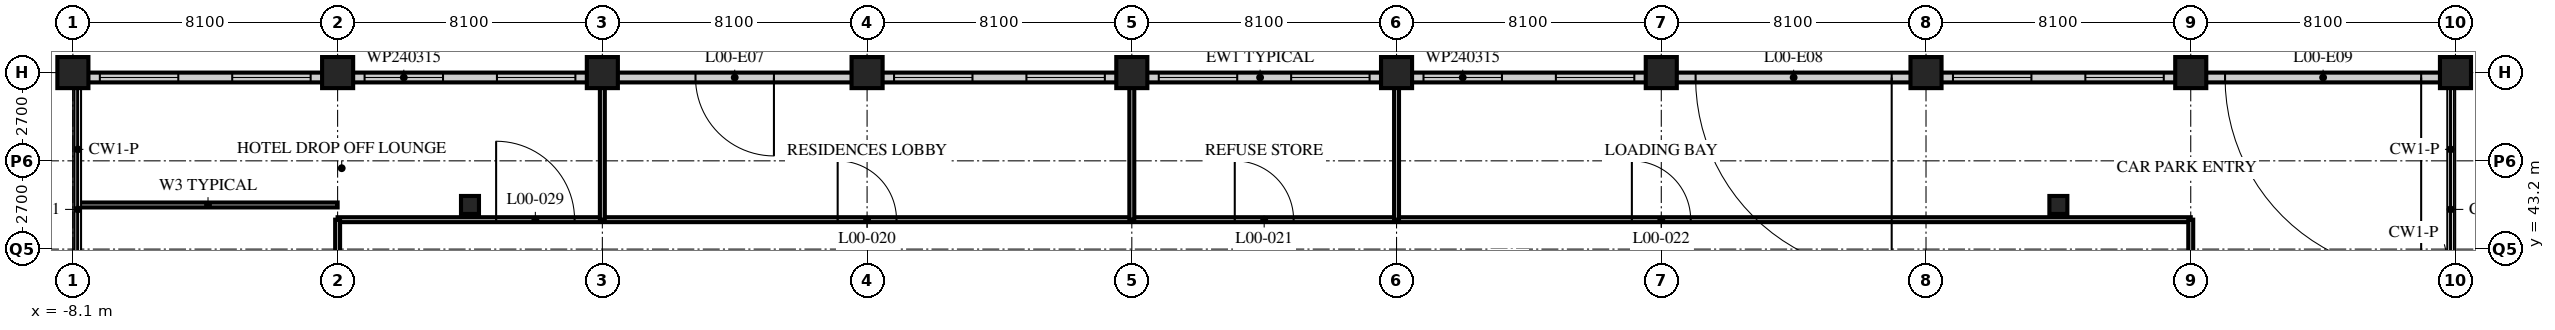
"""IFC4 building model, lengths in metres.
Left out: names, types, materials, properties, quantities, classifications, styles, units other than length and angle.
Written with IfcOpenShell. Run it as: python <this file> out.ifc"""

import sys

from ifc_helpers import new_model, si_unit, direction, frame, frame_2d, origin, origin_2d, place, context, subcontext, project, spatial, rectangle, hollow_rectangle, extrude, element, fill, save


model = new_model("IFC4")
c1 = context("Model", 3, precision=1e-05, world=origin(), true_north=direction((0.0, 1.0)))
c2 = subcontext(c1, "Body", "Model", "MODEL_VIEW")
j1 = project(units=[si_unit("LENGTHUNIT", "METRE"), si_unit("PLANEANGLEUNIT", "RADIAN")], contexts=[c1])
p1 = place(None, origin())
s1 = spatial("IfcSite", under=j1, at=p1, CompositionType="ELEMENT")
p2 = place(p1, origin())
s2 = spatial("IfcBuilding", under=s1, at=p2, CompositionType="ELEMENT")
p3 = place(p2, origin())
s3 = spatial("IfcBuildingStorey", under=s2, at=p3, CompositionType="ELEMENT", Elevation=0.0)
for number, where, z_axis, x_axis in (
    (1, (-8.1, 48.6, 0.0), (0.0, 0.0, 1.0), (1.0, 0.0, 0.0)),
    (2, (0.0, 48.6, 0.0), (0.0, 0.0, 1.0), (1.0, 0.0, 0.0)),
):
    element("IfcColumn", number, at=place(p3, frame(where, z_axis=z_axis, x_axis=x_axis)), inside=s3, PredefinedType="COLUMN", context=c2, shape_type="SweptSolid", body=[
        extrude(hollow_rectangle(XDim=0.95, YDim=0.95, WallThickness=0.1, at=origin_2d()), origin(), (0.0, 0.0, 1.0), 6.0),
    ])
p4 = place(p3, frame((4.05, 44.55, 0.0), z_axis=(0.0, 0.0, 1.0), x_axis=(1.0, 0.0, 0.0)))
e3 = element("IfcColumn", 3, at=p4, inside=s3, PredefinedType="COLUMN", context=c2, shape_type="SweptSolid", body=[
    extrude(hollow_rectangle(XDim=0.55, YDim=0.55, WallThickness=0.05, at=origin_2d()), origin(), (0.0, 0.0, 1.0), 6.0),
])
for number, where, z_axis, x_axis in (
    (4, (8.1, 48.6, 0.0), (0.0, 0.0, 1.0), (1.0, 0.0, 0.0)),
    (5, (16.2, 48.6, 0.0), (0.0, 0.0, 1.0), (1.0, 0.0, 0.0)),
    (6, (24.3, 48.6, 0.0), (0.0, 0.0, 1.0), (1.0, 0.0, 0.0)),
    (7, (32.4, 48.6, 0.0), (0.0, 0.0, 1.0), (1.0, 0.0, 0.0)),
    (8, (40.5, 48.6, 0.0), (0.0, 0.0, 1.0), (1.0, 0.0, 0.0)),
    (9, (48.6, 48.6, 0.0), (0.0, 0.0, 1.0), (1.0, 0.0, 0.0)),
):
    element("IfcColumn", number, at=place(p3, frame(where, z_axis=z_axis, x_axis=x_axis)), inside=s3, PredefinedType="COLUMN", context=c2, shape_type="SweptSolid", body=[
        extrude(hollow_rectangle(XDim=0.95, YDim=0.95, WallThickness=0.1, at=origin_2d()), origin(), (0.0, 0.0, 1.0), 6.0),
    ])
p5 = place(p3, frame((52.65, 44.55, 0.0), z_axis=(0.0, 0.0, 1.0), x_axis=(1.0, 0.0, 0.0)))
e10 = element("IfcColumn", 10, at=p5, inside=s3, PredefinedType="COLUMN", context=c2, shape_type="SweptSolid", body=[
    extrude(hollow_rectangle(XDim=0.55, YDim=0.55, WallThickness=0.05, at=origin_2d()), origin(), (0.0, 0.0, 1.0), 6.0),
])
for number, where, z_axis, x_axis in (
    (11, (56.7, 48.6, 0.0), (0.0, 0.0, 1.0), (1.0, 0.0, 0.0)),
    (12, (64.8, 48.6, 0.0), (0.0, 0.0, 1.0), (1.0, 0.0, 0.0)),
):
    element("IfcColumn", number, at=place(p3, frame(where, z_axis=z_axis, x_axis=x_axis)), inside=s3, PredefinedType="COLUMN", context=c2, shape_type="SweptSolid", body=[
        extrude(hollow_rectangle(XDim=0.95, YDim=0.95, WallThickness=0.1, at=origin_2d()), origin(), (0.0, 0.0, 1.0), 6.0),
    ])
p6 = place(p3, frame((64.55, 48.45, 0.0), z_axis=(0.0, 0.0, 1.0), x_axis=(-1.0, 0.0, 0.0)))
e13 = element("IfcWall", 13, at=p6, inside=s3, PredefinedType="SOLIDWALL", context=c2, shape_type="SweptSolid", body=[
    extrude(rectangle(XDim=72.65, YDim=0.3, at=frame_2d((36.325, 0.0))), origin(), (0.0, 0.0, 1.0), 5.75),
])
p7 = place(p6, frame((51.2, 0.0, 0.0)))
e14 = element("IfcOpeningElement", 14, at=p7, cuts=e13, PredefinedType="OPENING", context=c2, shape_type="SweptSolid", body=[
    extrude(rectangle(XDim=2.4, YDim=2.7, at=frame_2d((1.2, 1.35))), frame((0.0, 0.16, 0.0), z_axis=(0.0, -1.0, 0.0), x_axis=(1.0, 0.0, 0.0)), (0.0, 0.0, 1.0), 0.32),
])
p8 = place(p6, frame((17.0, 0.0, 0.0)))
e15 = element("IfcOpeningElement", 15, at=p8, cuts=e13, PredefinedType="OPENING", context=c2, shape_type="SweptSolid", body=[
    extrude(rectangle(XDim=6.0, YDim=3.6, at=frame_2d((3.0, 1.8))), frame((0.0, 0.16, 0.0), z_axis=(0.0, -1.0, 0.0), x_axis=(1.0, 0.0, 0.0)), (0.0, 0.0, 1.0), 0.32),
])
p9 = place(p6, frame((0.8, 0.0, 0.0)))
e16 = element("IfcOpeningElement", 16, at=p9, cuts=e13, PredefinedType="OPENING", context=c2, shape_type="SweptSolid", body=[
    extrude(rectangle(XDim=6.0, YDim=3.6, at=frame_2d((3.0, 1.8))), frame((0.0, 0.16, 0.0), z_axis=(0.0, -1.0, 0.0), x_axis=(1.0, 0.0, 0.0)), (0.0, 0.0, 1.0), 0.32),
])
p10 = place(p6, frame((8.675, 0.0, 1.2)))
e17 = element("IfcOpeningElement", 17, at=p10, cuts=e13, PredefinedType="OPENING", context=c2, shape_type="SweptSolid", body=[
    extrude(rectangle(XDim=2.4, YDim=3.15, at=frame_2d((1.2, 1.575))), frame((0.0, 0.16, 0.0), z_axis=(0.0, -1.0, 0.0), x_axis=(1.0, 0.0, 0.0)), (0.0, 0.0, 1.0), 0.32),
])
p11 = place(p6, frame((12.725, 0.0, 1.2)))
e18 = element("IfcOpeningElement", 18, at=p11, cuts=e13, PredefinedType="OPENING", context=c2, shape_type="SweptSolid", body=[
    extrude(rectangle(XDim=2.4, YDim=3.15, at=frame_2d((1.2, 1.575))), frame((0.0, 0.16, 0.0), z_axis=(0.0, -1.0, 0.0), x_axis=(1.0, 0.0, 0.0)), (0.0, 0.0, 1.0), 0.32),
])
p12 = place(p6, frame((24.875, 0.0, 1.2)))
e19 = element("IfcOpeningElement", 19, at=p12, cuts=e13, PredefinedType="OPENING", context=c2, shape_type="SweptSolid", body=[
    extrude(rectangle(XDim=2.4, YDim=3.15, at=frame_2d((1.2, 1.575))), frame((0.0, 0.16, 0.0), z_axis=(0.0, -1.0, 0.0), x_axis=(1.0, 0.0, 0.0)), (0.0, 0.0, 1.0), 0.32),
])
p13 = place(p6, frame((28.925, 0.0, 1.2)))
e20 = element("IfcOpeningElement", 20, at=p13, cuts=e13, PredefinedType="OPENING", context=c2, shape_type="SweptSolid", body=[
    extrude(rectangle(XDim=2.4, YDim=3.15, at=frame_2d((1.2, 1.575))), frame((0.0, 0.16, 0.0), z_axis=(0.0, -1.0, 0.0), x_axis=(1.0, 0.0, 0.0)), (0.0, 0.0, 1.0), 0.32),
])
p14 = place(p6, frame((32.975, 0.0, 1.2)))
e21 = element("IfcOpeningElement", 21, at=p14, cuts=e13, PredefinedType="OPENING", context=c2, shape_type="SweptSolid", body=[
    extrude(rectangle(XDim=2.4, YDim=3.15, at=frame_2d((1.2, 1.575))), frame((0.0, 0.16, 0.0), z_axis=(0.0, -1.0, 0.0), x_axis=(1.0, 0.0, 0.0)), (0.0, 0.0, 1.0), 0.32),
])
p15 = place(p6, frame((37.025, 0.0, 1.2)))
e22 = element("IfcOpeningElement", 22, at=p15, cuts=e13, PredefinedType="OPENING", context=c2, shape_type="SweptSolid", body=[
    extrude(rectangle(XDim=2.4, YDim=3.15, at=frame_2d((1.2, 1.575))), frame((0.0, 0.16, 0.0), z_axis=(0.0, -1.0, 0.0), x_axis=(1.0, 0.0, 0.0)), (0.0, 0.0, 1.0), 0.32),
])
p16 = place(p6, frame((41.075, 0.0, 1.2)))
e23 = element("IfcOpeningElement", 23, at=p16, cuts=e13, PredefinedType="OPENING", context=c2, shape_type="SweptSolid", body=[
    extrude(rectangle(XDim=2.4, YDim=3.15, at=frame_2d((1.2, 1.575))), frame((0.0, 0.16, 0.0), z_axis=(0.0, -1.0, 0.0), x_axis=(1.0, 0.0, 0.0)), (0.0, 0.0, 1.0), 0.32),
])
p17 = place(p6, frame((45.125, 0.0, 1.2)))
e24 = element("IfcOpeningElement", 24, at=p17, cuts=e13, PredefinedType="OPENING", context=c2, shape_type="SweptSolid", body=[
    extrude(rectangle(XDim=2.4, YDim=3.15, at=frame_2d((1.2, 1.575))), frame((0.0, 0.16, 0.0), z_axis=(0.0, -1.0, 0.0), x_axis=(1.0, 0.0, 0.0)), (0.0, 0.0, 1.0), 0.32),
])
p18 = place(p6, frame((57.275, 0.0, 1.2)))
e25 = element("IfcOpeningElement", 25, at=p18, cuts=e13, PredefinedType="OPENING", context=c2, shape_type="SweptSolid", body=[
    extrude(rectangle(XDim=2.4, YDim=3.15, at=frame_2d((1.2, 1.575))), frame((0.0, 0.16, 0.0), z_axis=(0.0, -1.0, 0.0), x_axis=(1.0, 0.0, 0.0)), (0.0, 0.0, 1.0), 0.32),
])
p19 = place(p6, frame((61.325, 0.0, 1.2)))
e26 = element("IfcOpeningElement", 26, at=p19, cuts=e13, PredefinedType="OPENING", context=c2, shape_type="SweptSolid", body=[
    extrude(rectangle(XDim=2.4, YDim=3.15, at=frame_2d((1.2, 1.575))), frame((0.0, 0.16, 0.0), z_axis=(0.0, -1.0, 0.0), x_axis=(1.0, 0.0, 0.0)), (0.0, 0.0, 1.0), 0.32),
])
p20 = place(p6, frame((65.375, 0.0, 1.2)))
e27 = element("IfcOpeningElement", 27, at=p20, cuts=e13, PredefinedType="OPENING", context=c2, shape_type="SweptSolid", body=[
    extrude(rectangle(XDim=2.4, YDim=3.15, at=frame_2d((1.2, 1.575))), frame((0.0, 0.16, 0.0), z_axis=(0.0, -1.0, 0.0), x_axis=(1.0, 0.0, 0.0)), (0.0, 0.0, 1.0), 0.32),
])
p21 = place(p6, frame((69.425, 0.0, 1.2)))
e28 = element("IfcOpeningElement", 28, at=p21, cuts=e13, PredefinedType="OPENING", context=c2, shape_type="SweptSolid", body=[
    extrude(rectangle(XDim=2.4, YDim=3.15, at=frame_2d((1.2, 1.575))), frame((0.0, 0.16, 0.0), z_axis=(0.0, -1.0, 0.0), x_axis=(1.0, 0.0, 0.0)), (0.0, 0.0, 1.0), 0.32),
])
p22 = place(p3, frame((0.0, 44.1, 0.0), z_axis=(0.0, 0.0, 1.0), x_axis=(1.0, 0.0, 0.0)))
e29 = element("IfcWall", 29, at=p22, inside=s3, PredefinedType="PARTITIONING", context=c2, shape_type="SweptSolid", body=[
    extrude(rectangle(XDim=56.7, YDim=0.15, at=frame_2d((28.35, 0.0))), origin(), (0.0, 0.0, 1.0), 5.75),
])
p23 = place(p22, frame((15.3, 0.0, 0.0)))
e30 = element("IfcOpeningElement", 30, at=p23, cuts=e29, PredefinedType="OPENING", context=c2, shape_type="SweptSolid", body=[
    extrude(rectangle(XDim=1.8, YDim=2.4, at=frame_2d((0.9, 1.2))), frame((0.0, 0.085, 0.0), z_axis=(0.0, -1.0, 0.0), x_axis=(1.0, 0.0, 0.0)), (0.0, 0.0, 1.0), 0.17),
])
p24 = place(p22, frame((27.45, 0.0, 0.0)))
e31 = element("IfcOpeningElement", 31, at=p24, cuts=e29, PredefinedType="OPENING", context=c2, shape_type="SweptSolid", body=[
    extrude(rectangle(XDim=1.8, YDim=2.4, at=frame_2d((0.9, 1.2))), frame((0.0, 0.085, 0.0), z_axis=(0.0, -1.0, 0.0), x_axis=(1.0, 0.0, 0.0)), (0.0, 0.0, 1.0), 0.17),
])
p25 = place(p22, frame((39.6, 0.0, 0.0)))
e32 = element("IfcOpeningElement", 32, at=p25, cuts=e29, PredefinedType="OPENING", context=c2, shape_type="SweptSolid", body=[
    extrude(rectangle(XDim=1.8, YDim=2.4, at=frame_2d((0.9, 1.2))), frame((0.0, 0.085, 0.0), z_axis=(0.0, -1.0, 0.0), x_axis=(1.0, 0.0, 0.0)), (0.0, 0.0, 1.0), 0.17),
])
p26 = place(p22, frame((4.85, 0.0, 0.0)))
e33 = element("IfcOpeningElement", 33, at=p26, cuts=e29, PredefinedType="OPENING", context=c2, shape_type="SweptSolid", body=[
    extrude(rectangle(XDim=2.4, YDim=2.7, at=frame_2d((1.2, 1.35))), frame((0.0, 0.085, 0.0), z_axis=(0.0, -1.0, 0.0), x_axis=(1.0, 0.0, 0.0)), (0.0, 0.0, 1.0), 0.17),
])
p27 = place(p3, frame((0.0, 0.0, 0.0), z_axis=(0.0, 0.0, 1.0), x_axis=(0.0, 1.0, 0.0)))
e34 = element("IfcWall", 34, at=p27, inside=s3, PredefinedType="PARTITIONING", context=c2, shape_type="SweptSolid", body=[
    extrude(rectangle(XDim=44.1, YDim=0.15, at=frame_2d((22.05, 0.0))), origin(), (0.0, 0.0, 1.0), 5.138),
])
p28 = place(p27, frame((3.15, 0.0, 0.0)))
e35 = element("IfcOpeningElement", 35, at=p28, cuts=e34, PredefinedType="OPENING", context=c2, shape_type="SweptSolid", body=[
    extrude(rectangle(XDim=1.8, YDim=2.4, at=frame_2d((0.9, 1.2))), frame((0.0, 0.085, 0.0), z_axis=(0.0, -1.0, 0.0), x_axis=(1.0, 0.0, 0.0)), (0.0, 0.0, 1.0), 0.17),
])
p29 = place(p27, frame((17.05, 0.0, 0.0)))
e36 = element("IfcOpeningElement", 36, at=p29, cuts=e34, PredefinedType="OPENING", context=c2, shape_type="SweptSolid", body=[
    extrude(rectangle(XDim=1.8, YDim=2.4, at=frame_2d((0.9, 1.2))), frame((0.0, 0.085, 0.0), z_axis=(0.0, -1.0, 0.0), x_axis=(1.0, 0.0, 0.0)), (0.0, 0.0, 1.0), 0.17),
])
p30 = place(p27, frame((27.45, 0.0, 0.0)))
e37 = element("IfcOpeningElement", 37, at=p30, cuts=e34, PredefinedType="OPENING", context=c2, shape_type="SweptSolid", body=[
    extrude(rectangle(XDim=1.8, YDim=2.4, at=frame_2d((0.9, 1.2))), frame((0.0, 0.085, 0.0), z_axis=(0.0, -1.0, 0.0), x_axis=(1.0, 0.0, 0.0)), (0.0, 0.0, 1.0), 0.17),
])
p31 = place(p27, frame((37.575, 0.0, 0.0)))
e38 = element("IfcOpeningElement", 38, at=p31, cuts=e34, PredefinedType="OPENING", context=c2, shape_type="SweptSolid", body=[
    extrude(rectangle(XDim=1.8, YDim=2.4, at=frame_2d((0.9, 1.2))), frame((0.0, 0.085, 0.0), z_axis=(0.0, -1.0, 0.0), x_axis=(1.0, 0.0, 0.0)), (0.0, 0.0, 1.0), 0.17),
])
p32 = place(p3, frame((56.7, 0.0, 0.0), z_axis=(0.0, 0.0, 1.0), x_axis=(0.0, 1.0, 0.0)))
e39 = element("IfcWall", 39, at=p32, inside=s3, PredefinedType="PARTITIONING", context=c2, shape_type="SweptSolid", body=[
    extrude(rectangle(XDim=44.1, YDim=0.15, at=frame_2d((22.05, 0.0))), origin(), (0.0, 0.0, 1.0), 5.138),
])
for number, where, z_axis, x_axis in (
    (40, (24.3, 44.1, 0.0), (0.0, 0.0, 1.0), (0.0, 1.0, 0.0)),
    (41, (32.4, 44.1, 0.0), (0.0, 0.0, 1.0), (0.0, 1.0, 0.0)),
):
    element("IfcWall", number, at=place(p3, frame(where, z_axis=z_axis, x_axis=x_axis)), inside=s3, PredefinedType="PARTITIONING", context=c2, shape_type="SweptSolid", body=[
        extrude(rectangle(XDim=4.2, YDim=0.15, at=frame_2d((2.1, 0.0))), origin(), (0.0, 0.0, 1.0), 5.138),
    ])
p33 = place(p3, frame((-7.931, 44.55, 0.0), z_axis=(0.0, 0.0, 1.0), x_axis=(1.0, 0.0, 0.0)))
e42 = element("IfcWall", 42, at=p33, inside=s3, PredefinedType="PARTITIONING", context=c2, shape_type="SweptSolid", body=[
    extrude(rectangle(XDim=7.931, YDim=0.15, at=frame_2d((3.965, 0.0))), origin(), (0.0, 0.0, 1.0), 5.75),
])
p34 = place(p3, frame((8.1, 44.1, 0.0), z_axis=(0.0, 0.0, 1.0), x_axis=(0.0, 1.0, 0.0)))
e43 = element("IfcWall", 43, at=p34, inside=s3, PredefinedType="PARTITIONING", context=c2, shape_type="SweptSolid", body=[
    extrude(rectangle(XDim=4.2, YDim=0.15, at=frame_2d((2.1, 0.0))), origin(), (0.0, 0.0, 1.0), 5.138),
])
p35 = place(p7, origin())
e44 = element("IfcDoor", 44, at=p35, inside=s3, OperationType="DOUBLE_DOOR_SINGLE_SWING", PredefinedType="DOOR", context=c2, shape_type="SweptSolid", body=[
    extrude(rectangle(XDim=2.4, YDim=2.7, at=frame_2d((1.2, 1.35))), frame((0.0, 0.025, 0.0), z_axis=(0.0, -1.0, 0.0), x_axis=(1.0, 0.0, 0.0)), (0.0, 0.0, 1.0), 0.05),
])
fill(e14, e44)
p36 = place(p8, origin())
e45 = element("IfcDoor", 45, at=p36, inside=s3, OperationType="ROLLINGUP", PredefinedType="DOOR", context=c2, shape_type="SweptSolid", body=[
    extrude(rectangle(XDim=6.0, YDim=3.6, at=frame_2d((3.0, 1.8))), frame((0.0, 0.025, 0.0), z_axis=(0.0, -1.0, 0.0), x_axis=(1.0, 0.0, 0.0)), (0.0, 0.0, 1.0), 0.05),
])
fill(e15, e45)
p37 = place(p9, origin())
e46 = element("IfcDoor", 46, at=p37, inside=s3, OperationType="ROLLINGUP", PredefinedType="DOOR", context=c2, shape_type="SweptSolid", body=[
    extrude(rectangle(XDim=6.0, YDim=3.6, at=frame_2d((3.0, 1.8))), frame((0.0, 0.025, 0.0), z_axis=(0.0, -1.0, 0.0), x_axis=(1.0, 0.0, 0.0)), (0.0, 0.0, 1.0), 0.05),
])
fill(e16, e46)
p38 = place(p10, origin())
e47 = element("IfcWindow", 47, at=p38, inside=s3, PartitioningType="SINGLE_PANEL", PredefinedType="WINDOW", context=c2, shape_type="SweptSolid", body=[
    extrude(rectangle(XDim=2.4, YDim=3.15, at=frame_2d((1.2, 1.575))), frame((0.0, 0.03, 0.0), z_axis=(0.0, -1.0, 0.0), x_axis=(1.0, 0.0, 0.0)), (0.0, 0.0, 1.0), 0.06),
])
fill(e17, e47)
p39 = place(p11, origin())
e48 = element("IfcWindow", 48, at=p39, inside=s3, PartitioningType="SINGLE_PANEL", PredefinedType="WINDOW", context=c2, shape_type="SweptSolid", body=[
    extrude(rectangle(XDim=2.4, YDim=3.15, at=frame_2d((1.2, 1.575))), frame((0.0, 0.03, 0.0), z_axis=(0.0, -1.0, 0.0), x_axis=(1.0, 0.0, 0.0)), (0.0, 0.0, 1.0), 0.06),
])
fill(e18, e48)
p40 = place(p12, origin())
e49 = element("IfcWindow", 49, at=p40, inside=s3, PartitioningType="SINGLE_PANEL", PredefinedType="WINDOW", context=c2, shape_type="SweptSolid", body=[
    extrude(rectangle(XDim=2.4, YDim=3.15, at=frame_2d((1.2, 1.575))), frame((0.0, 0.03, 0.0), z_axis=(0.0, -1.0, 0.0), x_axis=(1.0, 0.0, 0.0)), (0.0, 0.0, 1.0), 0.06),
])
fill(e19, e49)
p41 = place(p13, origin())
e50 = element("IfcWindow", 50, at=p41, inside=s3, PartitioningType="SINGLE_PANEL", PredefinedType="WINDOW", context=c2, shape_type="SweptSolid", body=[
    extrude(rectangle(XDim=2.4, YDim=3.15, at=frame_2d((1.2, 1.575))), frame((0.0, 0.03, 0.0), z_axis=(0.0, -1.0, 0.0), x_axis=(1.0, 0.0, 0.0)), (0.0, 0.0, 1.0), 0.06),
])
fill(e20, e50)
p42 = place(p14, origin())
e51 = element("IfcWindow", 51, at=p42, inside=s3, PartitioningType="SINGLE_PANEL", PredefinedType="WINDOW", context=c2, shape_type="SweptSolid", body=[
    extrude(rectangle(XDim=2.4, YDim=3.15, at=frame_2d((1.2, 1.575))), frame((0.0, 0.03, 0.0), z_axis=(0.0, -1.0, 0.0), x_axis=(1.0, 0.0, 0.0)), (0.0, 0.0, 1.0), 0.06),
])
fill(e21, e51)
p43 = place(p15, origin())
e52 = element("IfcWindow", 52, at=p43, inside=s3, PartitioningType="SINGLE_PANEL", PredefinedType="WINDOW", context=c2, shape_type="SweptSolid", body=[
    extrude(rectangle(XDim=2.4, YDim=3.15, at=frame_2d((1.2, 1.575))), frame((0.0, 0.03, 0.0), z_axis=(0.0, -1.0, 0.0), x_axis=(1.0, 0.0, 0.0)), (0.0, 0.0, 1.0), 0.06),
])
fill(e22, e52)
p44 = place(p16, origin())
e53 = element("IfcWindow", 53, at=p44, inside=s3, PartitioningType="SINGLE_PANEL", PredefinedType="WINDOW", context=c2, shape_type="SweptSolid", body=[
    extrude(rectangle(XDim=2.4, YDim=3.15, at=frame_2d((1.2, 1.575))), frame((0.0, 0.03, 0.0), z_axis=(0.0, -1.0, 0.0), x_axis=(1.0, 0.0, 0.0)), (0.0, 0.0, 1.0), 0.06),
])
fill(e23, e53)
p45 = place(p17, origin())
e54 = element("IfcWindow", 54, at=p45, inside=s3, PartitioningType="SINGLE_PANEL", PredefinedType="WINDOW", context=c2, shape_type="SweptSolid", body=[
    extrude(rectangle(XDim=2.4, YDim=3.15, at=frame_2d((1.2, 1.575))), frame((0.0, 0.03, 0.0), z_axis=(0.0, -1.0, 0.0), x_axis=(1.0, 0.0, 0.0)), (0.0, 0.0, 1.0), 0.06),
])
fill(e24, e54)
p46 = place(p18, origin())
e55 = element("IfcWindow", 55, at=p46, inside=s3, PartitioningType="SINGLE_PANEL", PredefinedType="WINDOW", context=c2, shape_type="SweptSolid", body=[
    extrude(rectangle(XDim=2.4, YDim=3.15, at=frame_2d((1.2, 1.575))), frame((0.0, 0.03, 0.0), z_axis=(0.0, -1.0, 0.0), x_axis=(1.0, 0.0, 0.0)), (0.0, 0.0, 1.0), 0.06),
])
fill(e25, e55)
p47 = place(p19, origin())
e56 = element("IfcWindow", 56, at=p47, inside=s3, PartitioningType="SINGLE_PANEL", PredefinedType="WINDOW", context=c2, shape_type="SweptSolid", body=[
    extrude(rectangle(XDim=2.4, YDim=3.15, at=frame_2d((1.2, 1.575))), frame((0.0, 0.03, 0.0), z_axis=(0.0, -1.0, 0.0), x_axis=(1.0, 0.0, 0.0)), (0.0, 0.0, 1.0), 0.06),
])
fill(e26, e56)
p48 = place(p20, origin())
e57 = element("IfcWindow", 57, at=p48, inside=s3, PartitioningType="SINGLE_PANEL", PredefinedType="WINDOW", context=c2, shape_type="SweptSolid", body=[
    extrude(rectangle(XDim=2.4, YDim=3.15, at=frame_2d((1.2, 1.575))), frame((0.0, 0.03, 0.0), z_axis=(0.0, -1.0, 0.0), x_axis=(1.0, 0.0, 0.0)), (0.0, 0.0, 1.0), 0.06),
])
fill(e27, e57)
p49 = place(p21, origin())
e58 = element("IfcWindow", 58, at=p49, inside=s3, PartitioningType="SINGLE_PANEL", PredefinedType="WINDOW", context=c2, shape_type="SweptSolid", body=[
    extrude(rectangle(XDim=2.4, YDim=3.15, at=frame_2d((1.2, 1.575))), frame((0.0, 0.03, 0.0), z_axis=(0.0, -1.0, 0.0), x_axis=(1.0, 0.0, 0.0)), (0.0, 0.0, 1.0), 0.06),
])
fill(e28, e58)
p50 = place(p23, origin())
e59 = element("IfcDoor", 59, at=p50, inside=s3, OperationType="DOUBLE_DOOR_SINGLE_SWING", PredefinedType="DOOR", context=c2, shape_type="SweptSolid", body=[
    extrude(rectangle(XDim=1.8, YDim=2.4, at=frame_2d((0.9, 1.2))), frame((0.0, 0.025, 0.0), z_axis=(0.0, -1.0, 0.0), x_axis=(1.0, 0.0, 0.0)), (0.0, 0.0, 1.0), 0.05),
])
fill(e30, e59)
p51 = place(p24, origin())
e60 = element("IfcDoor", 60, at=p51, inside=s3, OperationType="DOUBLE_DOOR_SINGLE_SWING", PredefinedType="DOOR", context=c2, shape_type="SweptSolid", body=[
    extrude(rectangle(XDim=1.8, YDim=2.4, at=frame_2d((0.9, 1.2))), frame((0.0, 0.025, 0.0), z_axis=(0.0, -1.0, 0.0), x_axis=(1.0, 0.0, 0.0)), (0.0, 0.0, 1.0), 0.05),
])
fill(e31, e60)
p52 = place(p25, origin())
e61 = element("IfcDoor", 61, at=p52, inside=s3, OperationType="DOUBLE_DOOR_SINGLE_SWING", PredefinedType="DOOR", context=c2, shape_type="SweptSolid", body=[
    extrude(rectangle(XDim=1.8, YDim=2.4, at=frame_2d((0.9, 1.2))), frame((0.0, 0.025, 0.0), z_axis=(0.0, -1.0, 0.0), x_axis=(1.0, 0.0, 0.0)), (0.0, 0.0, 1.0), 0.05),
])
fill(e32, e61)
p53 = place(p26, origin())
e62 = element("IfcDoor", 62, at=p53, inside=s3, OperationType="DOUBLE_DOOR_SINGLE_SWING", PredefinedType="DOOR", context=c2, shape_type="SweptSolid", body=[
    extrude(rectangle(XDim=2.4, YDim=2.7, at=frame_2d((1.2, 1.35))), frame((0.0, 0.025, 0.0), z_axis=(0.0, -1.0, 0.0), x_axis=(1.0, 0.0, 0.0)), (0.0, 0.0, 1.0), 0.05),
])
fill(e33, e62)
save(model, sys.argv[1])
